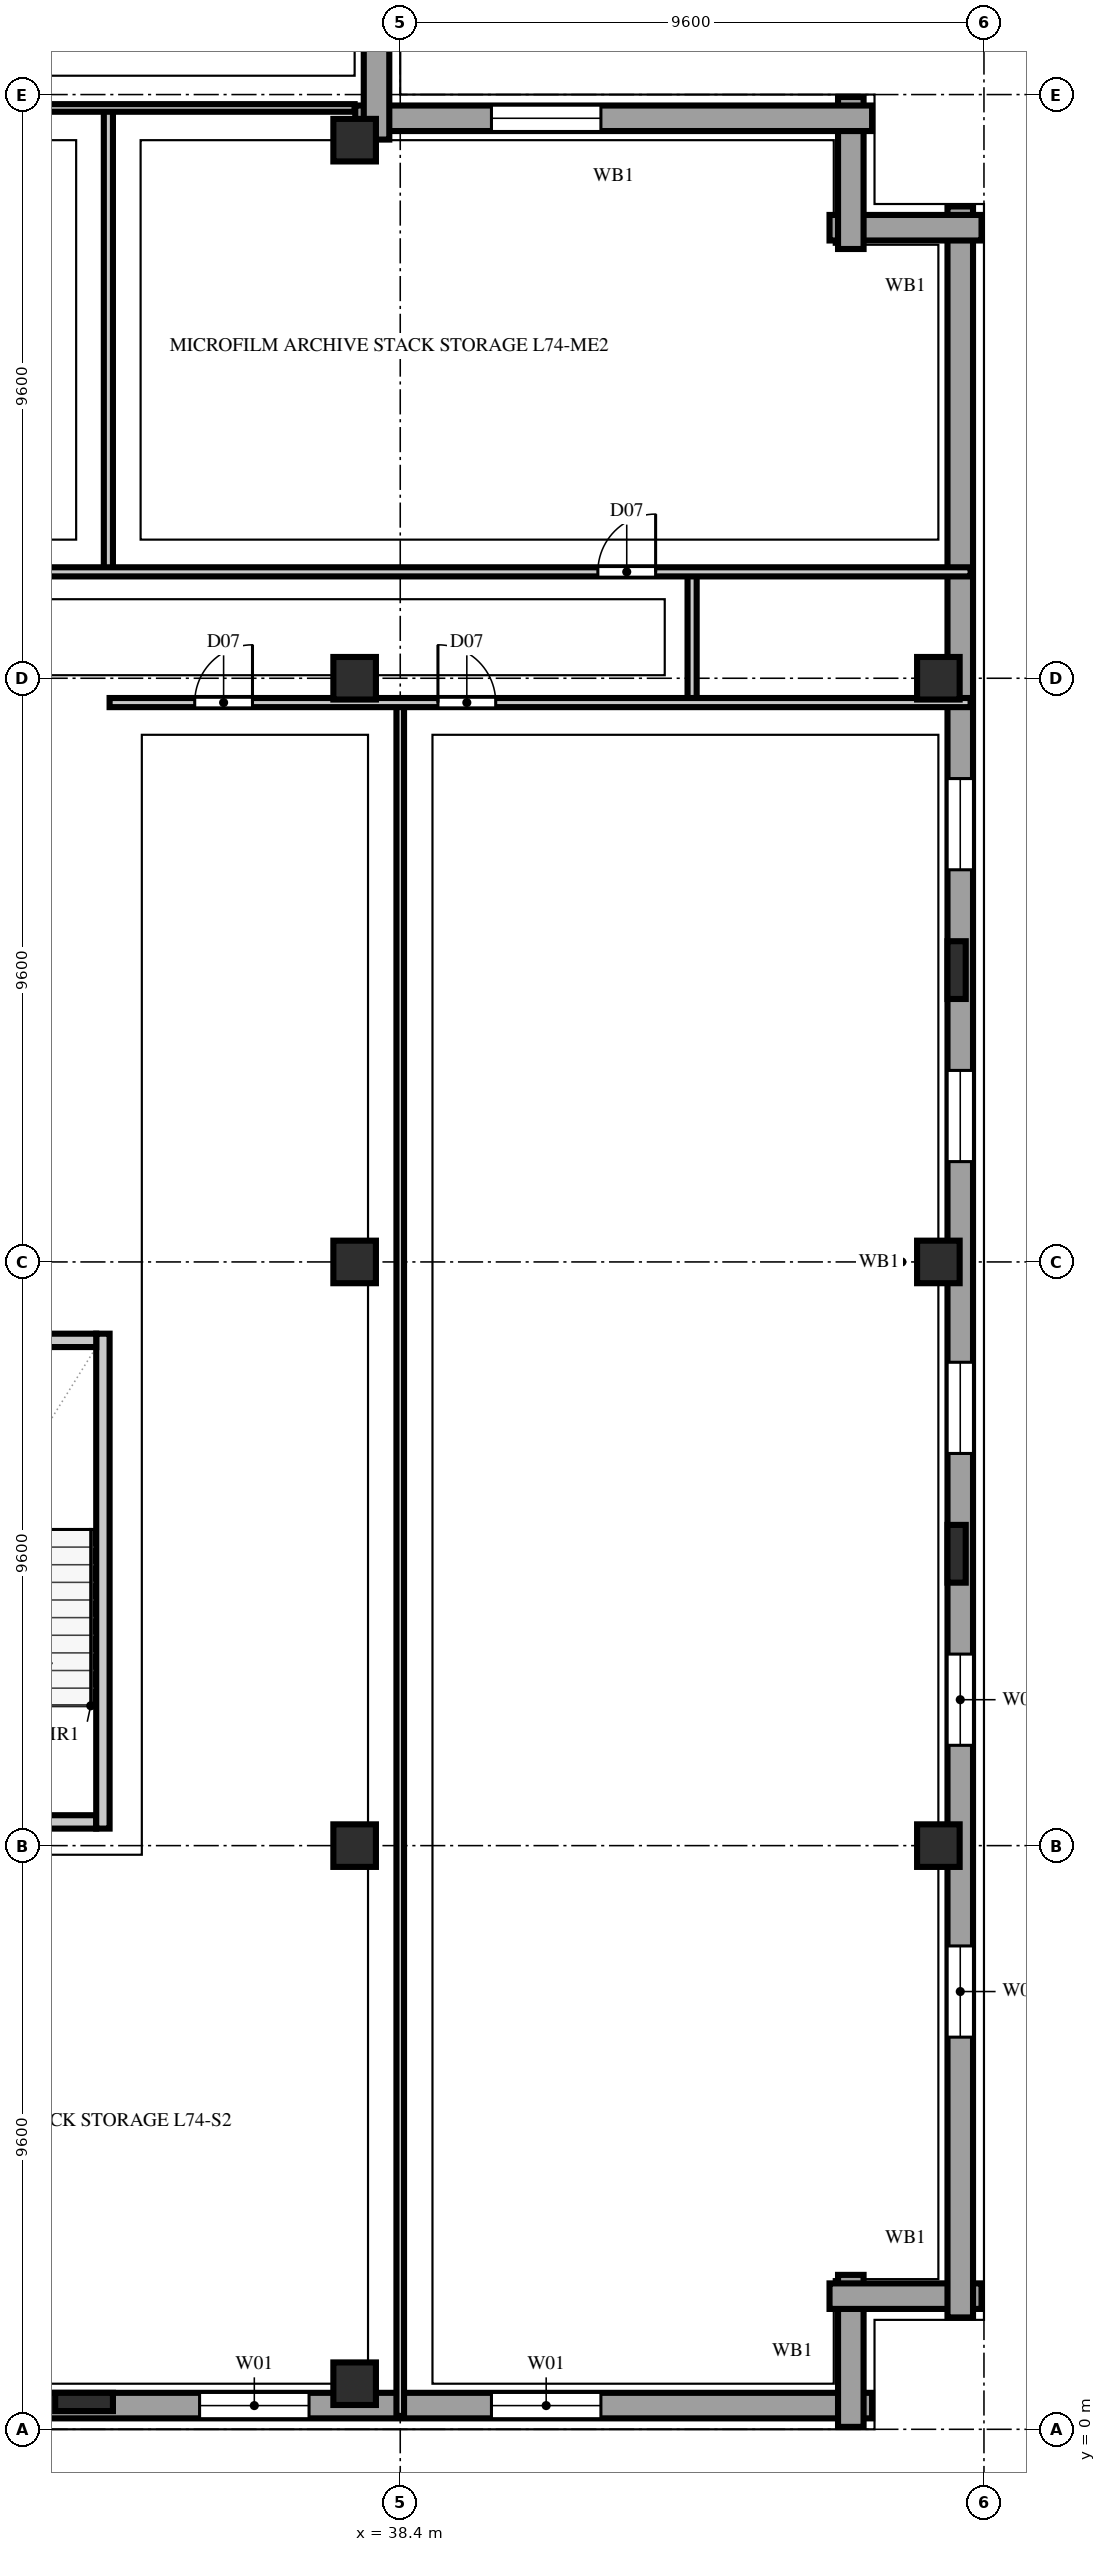
"""IFC4 building model, lengths in metres.
Left out: names, types, materials, properties, quantities, classifications, styles, units other than length and angle.
Written with IfcOpenShell. Run it as: python <this file> out.ifc"""

import sys

from ifc_helpers import new_model, si_unit, direction, frame, frame_2d, origin, origin_2d, place, context, subcontext, project, spatial, rectangle, extrude, element, fill, save


model = new_model("IFC4")
c1 = context("Model", 3, precision=1e-05, world=origin(), true_north=direction((0.0, 1.0)))
c2 = subcontext(c1, "Body", "Model", "MODEL_VIEW")
j1 = project(units=[si_unit("LENGTHUNIT", "METRE"), si_unit("PLANEANGLEUNIT", "RADIAN")], contexts=[c1])
p1 = place(None, origin())
s1 = spatial("IfcSite", under=j1, at=p1, CompositionType="ELEMENT")
p2 = place(p1, origin())
s2 = spatial("IfcBuilding", under=s1, at=p2, CompositionType="ELEMENT")
p3 = place(p2, frame((0.0, 0.0, 292.4)))
s3 = spatial("IfcBuildingStorey", under=s2, at=p3, CompositionType="ELEMENT", Elevation=292.4)
for number, where, z_axis, x_axis in (
    (1, (37.65, 0.75, 0.0), (0.0, 0.0, 1.0), (1.0, 0.0, 0.0)),
    (2, (37.65, 9.6, 0.0), (0.0, 0.0, 1.0), (1.0, 0.0, 0.0)),
    (3, (37.65, 19.2, 0.0), (0.0, 0.0, 1.0), (1.0, 0.0, 0.0)),
    (4, (37.65, 28.8, 0.0), (0.0, 0.0, 1.0), (1.0, 0.0, 0.0)),
    (5, (37.65, 37.65, 0.0), (0.0, 0.0, 1.0), (1.0, 0.0, 0.0)),
    (6, (47.25, 9.6, 0.0), (0.0, 0.0, 1.0), (1.0, 0.0, 0.0)),
    (7, (47.25, 19.2, 0.0), (0.0, 0.0, 1.0), (1.0, 0.0, 0.0)),
    (8, (47.25, 28.8, 0.0), (0.0, 0.0, 1.0), (1.0, 0.0, 0.0)),
):
    element("IfcColumn", number, at=place(p3, frame(where, z_axis=z_axis, x_axis=x_axis)), inside=s3, PredefinedType="COLUMN", context=c2, shape_type="SweptSolid", body=[
        extrude(rectangle(XDim=0.7, YDim=0.7, at=origin_2d()), origin(), (0.0, 0.0, 1.0), 3.8),
    ])
for number, where, z_axis, x_axis in (
    (9, (33.2, 0.45, 0.0), (0.0, 0.0, 1.0), (1.0, 0.0, 0.0)),
    (10, (47.55, 14.4, 0.0), (0.0, 0.0, 1.0), (0.0, 1.0, 0.0)),
    (11, (47.55, 24.0, 0.0), (0.0, 0.0, 1.0), (0.0, 1.0, 0.0)),
):
    element("IfcColumn", number, at=place(p3, frame(where, z_axis=z_axis, x_axis=x_axis)), inside=s3, PredefinedType="PILASTER", context=c2, shape_type="SweptSolid", body=[
        extrude(rectangle(XDim=0.95, YDim=0.3, at=origin_2d()), origin(), (0.0, 0.0, 1.0), 3.8),
    ])
p4 = place(p3, frame((1.84, 0.39, 0.0), z_axis=(0.0, 0.0, 1.0), x_axis=(1.0, 0.0, 0.0)))
e12 = element("IfcWall", 12, at=p4, inside=s3, PredefinedType="SOLIDWALL", context=c2, shape_type="SweptSolid", body=[
    extrude(rectangle(XDim=44.32, YDim=0.42, at=frame_2d((22.16, 0.0))), origin(), (0.0, 0.0, 1.0), 3.54),
])
p5 = place(p4, frame((4.46, 0.0, 0.85)))
e13 = element("IfcOpeningElement", 13, at=p5, cuts=e12, PredefinedType="OPENING", context=c2, shape_type="SweptSolid", body=[
    extrude(rectangle(XDim=1.8, YDim=1.85, at=frame_2d((0.9, 0.925))), frame((0.0, 0.222, 0.0), z_axis=(0.0, -1.0, 0.0), x_axis=(1.0, 0.0, 0.0)), (0.0, 0.0, 1.0), 0.444),
])
p6 = place(p4, frame((9.26, 0.0, 0.85)))
e14 = element("IfcOpeningElement", 14, at=p6, cuts=e12, PredefinedType="OPENING", context=c2, shape_type="SweptSolid", body=[
    extrude(rectangle(XDim=1.8, YDim=1.85, at=frame_2d((0.9, 0.925))), frame((0.0, 0.222, 0.0), z_axis=(0.0, -1.0, 0.0), x_axis=(1.0, 0.0, 0.0)), (0.0, 0.0, 1.0), 0.444),
])
p7 = place(p4, frame((18.86, 0.0, 0.85)))
e15 = element("IfcOpeningElement", 15, at=p7, cuts=e12, PredefinedType="OPENING", context=c2, shape_type="SweptSolid", body=[
    extrude(rectangle(XDim=1.8, YDim=1.85, at=frame_2d((0.9, 0.925))), frame((0.0, 0.222, 0.0), z_axis=(0.0, -1.0, 0.0), x_axis=(1.0, 0.0, 0.0)), (0.0, 0.0, 1.0), 0.444),
])
p8 = place(p4, frame((28.46, 0.0, 0.85)))
e16 = element("IfcOpeningElement", 16, at=p8, cuts=e12, PredefinedType="OPENING", context=c2, shape_type="SweptSolid", body=[
    extrude(rectangle(XDim=1.8, YDim=1.85, at=frame_2d((0.9, 0.925))), frame((0.0, 0.222, 0.0), z_axis=(0.0, -1.0, 0.0), x_axis=(1.0, 0.0, 0.0)), (0.0, 0.0, 1.0), 0.444),
])
p9 = place(p4, frame((33.26, 0.0, 0.85)))
e17 = element("IfcOpeningElement", 17, at=p9, cuts=e12, PredefinedType="OPENING", context=c2, shape_type="SweptSolid", body=[
    extrude(rectangle(XDim=1.8, YDim=1.85, at=frame_2d((0.9, 0.925))), frame((0.0, 0.222, 0.0), z_axis=(0.0, -1.0, 0.0), x_axis=(1.0, 0.0, 0.0)), (0.0, 0.0, 1.0), 0.444),
])
p10 = place(p4, frame((38.06, 0.0, 0.85)))
e18 = element("IfcOpeningElement", 18, at=p10, cuts=e12, PredefinedType="OPENING", context=c2, shape_type="SweptSolid", body=[
    extrude(rectangle(XDim=1.8, YDim=1.85, at=frame_2d((0.9, 0.925))), frame((0.0, 0.222, 0.0), z_axis=(0.0, -1.0, 0.0), x_axis=(1.0, 0.0, 0.0)), (0.0, 0.0, 1.0), 0.444),
])
for number, where, z_axis, x_axis in (
    (19, (45.81, 0.04, 0.0), (0.0, 0.0, 1.0), (0.0, 1.0, 0.0)),
    (20, (45.46, 2.19, 0.0), (0.0, 0.0, 1.0), (1.0, 0.0, 0.0)),
):
    element("IfcWall", number, at=place(p3, frame(where, z_axis=z_axis, x_axis=x_axis)), inside=s3, PredefinedType="SOLIDWALL", context=c2, shape_type="SweptSolid", body=[
        extrude(rectangle(XDim=2.5, YDim=0.42, at=frame_2d((1.25, 0.0))), origin(), (0.0, 0.0, 1.0), 3.54),
    ])
p11 = place(p3, frame((47.61, 1.84, 0.0), z_axis=(0.0, 0.0, 1.0), x_axis=(0.0, 1.0, 0.0)))
e21 = element("IfcWall", 21, at=p11, inside=s3, PredefinedType="SOLIDWALL", context=c2, shape_type="SweptSolid", body=[
    extrude(rectangle(XDim=34.72, YDim=0.42, at=frame_2d((17.36, 0.0))), origin(), (0.0, 0.0, 1.0), 3.54),
])
p12 = place(p11, frame((4.61, 0.0, 0.85)))
e22 = element("IfcOpeningElement", 22, at=p12, cuts=e21, PredefinedType="OPENING", context=c2, shape_type="SweptSolid", body=[
    extrude(rectangle(XDim=1.5, YDim=1.85, at=frame_2d((0.75, 0.925))), frame((0.0, 0.222, 0.0), z_axis=(0.0, -1.0, 0.0), x_axis=(1.0, 0.0, 0.0)), (0.0, 0.0, 1.0), 0.444),
])
p13 = place(p11, frame((9.41, 0.0, 0.85)))
e23 = element("IfcOpeningElement", 23, at=p13, cuts=e21, PredefinedType="OPENING", context=c2, shape_type="SweptSolid", body=[
    extrude(rectangle(XDim=1.5, YDim=1.85, at=frame_2d((0.75, 0.925))), frame((0.0, 0.222, 0.0), z_axis=(0.0, -1.0, 0.0), x_axis=(1.0, 0.0, 0.0)), (0.0, 0.0, 1.0), 0.444),
])
p14 = place(p11, frame((14.21, 0.0, 0.85)))
e24 = element("IfcOpeningElement", 24, at=p14, cuts=e21, PredefinedType="OPENING", context=c2, shape_type="SweptSolid", body=[
    extrude(rectangle(XDim=1.5, YDim=1.85, at=frame_2d((0.75, 0.925))), frame((0.0, 0.222, 0.0), z_axis=(0.0, -1.0, 0.0), x_axis=(1.0, 0.0, 0.0)), (0.0, 0.0, 1.0), 0.444),
])
p15 = place(p11, frame((19.01, 0.0, 0.85)))
e25 = element("IfcOpeningElement", 25, at=p15, cuts=e21, PredefinedType="OPENING", context=c2, shape_type="SweptSolid", body=[
    extrude(rectangle(XDim=1.5, YDim=1.85, at=frame_2d((0.75, 0.925))), frame((0.0, 0.222, 0.0), z_axis=(0.0, -1.0, 0.0), x_axis=(1.0, 0.0, 0.0)), (0.0, 0.0, 1.0), 0.444),
])
p16 = place(p11, frame((23.81, 0.0, 0.85)))
e26 = element("IfcOpeningElement", 26, at=p16, cuts=e21, PredefinedType="OPENING", context=c2, shape_type="SweptSolid", body=[
    extrude(rectangle(XDim=1.5, YDim=1.85, at=frame_2d((0.75, 0.925))), frame((0.0, 0.222, 0.0), z_axis=(0.0, -1.0, 0.0), x_axis=(1.0, 0.0, 0.0)), (0.0, 0.0, 1.0), 0.444),
])
for number, where, z_axis, x_axis in (
    (27, (47.96, 36.21, 0.0), (0.0, 0.0, 1.0), (-1.0, 0.0, 0.0)),
    (28, (45.81, 35.86, 0.0), (0.0, 0.0, 1.0), (0.0, 1.0, 0.0)),
):
    element("IfcWall", number, at=place(p3, frame(where, z_axis=z_axis, x_axis=x_axis)), inside=s3, PredefinedType="SOLIDWALL", context=c2, shape_type="SweptSolid", body=[
        extrude(rectangle(XDim=2.5, YDim=0.42, at=frame_2d((1.25, 0.0))), origin(), (0.0, 0.0, 1.0), 3.54),
    ])
p17 = place(p3, frame((46.16, 38.01, 0.0), z_axis=(0.0, 0.0, 1.0), x_axis=(-1.0, 0.0, 0.0)))
e29 = element("IfcWall", 29, at=p17, inside=s3, PredefinedType="SOLIDWALL", context=c2, shape_type="SweptSolid", body=[
    extrude(rectangle(XDim=8.5, YDim=0.42, at=frame_2d((4.25, 0.0))), origin(), (0.0, 0.0, 1.0), 3.54),
])
p18 = place(p17, frame((4.46, 0.0, 0.85)))
e30 = element("IfcOpeningElement", 30, at=p18, cuts=e29, PredefinedType="OPENING", context=c2, shape_type="SweptSolid", body=[
    extrude(rectangle(XDim=1.8, YDim=1.85, at=frame_2d((0.9, 0.925))), frame((0.0, 0.222, 0.0), z_axis=(0.0, -1.0, 0.0), x_axis=(1.0, 0.0, 0.0)), (0.0, 0.0, 1.0), 0.444),
])
p19 = place(p3, frame((38.01, 37.66, 0.0), z_axis=(0.0, 0.0, 1.0), x_axis=(0.0, 1.0, 0.0)))
e31 = element("IfcWall", 31, at=p19, inside=s3, PredefinedType="SOLIDWALL", context=c2, shape_type="SweptSolid", body=[
    extrude(rectangle(XDim=8.5, YDim=0.42, at=frame_2d((4.25, 0.0))), origin(), (0.0, 0.0, 1.0), 3.54),
])
p20 = place(p19, frame((2.24, 0.0, 0.85)))
e32 = element("IfcOpeningElement", 32, at=p20, cuts=e31, PredefinedType="OPENING", context=c2, shape_type="SweptSolid", body=[
    extrude(rectangle(XDim=1.8, YDim=1.85, at=frame_2d((0.9, 0.925))), frame((0.0, 0.222, 0.0), z_axis=(0.0, -1.0, 0.0), x_axis=(1.0, 0.0, 0.0)), (0.0, 0.0, 1.0), 0.444),
])
p21 = place(p3, frame((29.75, 9.99, 0.0), z_axis=(0.0, 0.0, 1.0), x_axis=(1.0, 0.0, 0.0)))
e33 = element("IfcWall", 33, at=p21, inside=s3, PredefinedType="SOLIDWALL", context=c2, shape_type="SweptSolid", body=[
    extrude(rectangle(XDim=3.65, YDim=0.22, at=frame_2d((1.825, 0.0))), origin(), (0.0, 0.0, 1.0), 3.54),
])
p22 = place(p3, frame((33.51, 9.88, 0.0), z_axis=(0.0, 0.0, 1.0), x_axis=(0.0, 1.0, 0.0)))
e34 = element("IfcWall", 34, at=p22, inside=s3, PredefinedType="SOLIDWALL", context=c2, shape_type="SweptSolid", body=[
    extrude(rectangle(XDim=8.14, YDim=0.22, at=frame_2d((4.07, 0.0))), origin(), (0.0, 0.0, 1.0), 3.54),
])
p23 = place(p3, frame((29.75, 17.91, 0.0), z_axis=(0.0, 0.0, 1.0), x_axis=(1.0, 0.0, 0.0)))
e35 = element("IfcWall", 35, at=p23, inside=s3, PredefinedType="SOLIDWALL", context=c2, shape_type="SweptSolid", body=[
    extrude(rectangle(XDim=3.65, YDim=0.22, at=frame_2d((1.825, 0.0))), origin(), (0.0, 0.0, 1.0), 3.54),
])
p24 = place(p3, frame((43.2, 28.4, 0.0), z_axis=(0.0, 0.0, 1.0), x_axis=(0.0, 1.0, 0.0)))
e36 = element("IfcWall", 36, at=p24, inside=s3, PredefinedType="PARTITIONING", context=c2, shape_type="SweptSolid", body=[
    extrude(rectangle(XDim=2.15, YDim=0.15, at=frame_2d((1.075, 0.0))), origin(), (0.0, 0.0, 1.0), 3.54),
])
p25 = place(p3, frame((38.4, 0.22, 0.0), z_axis=(0.0, 0.0, 1.0), x_axis=(0.0, 1.0, 0.0)))
e37 = element("IfcWall", 37, at=p25, inside=s3, PredefinedType="PARTITIONING", context=c2, shape_type="SweptSolid", body=[
    extrude(rectangle(XDim=28.18, YDim=0.125, at=frame_2d((14.09, 0.0))), origin(), (0.0, 0.0, 1.0), 3.54),
])
p26 = place(p3, frame((33.62, 28.4, 0.0), z_axis=(0.0, 0.0, 1.0), x_axis=(1.0, 0.0, 0.0)))
e38 = element("IfcWall", 38, at=p26, inside=s3, PredefinedType="PARTITIONING", context=c2, shape_type="SweptSolid", body=[
    extrude(rectangle(XDim=14.16, YDim=0.15, at=frame_2d((7.08, 0.0))), origin(), (0.0, 0.0, 1.0), 3.54),
])
p27 = place(p26, frame((1.4, 0.0, 0.0)))
e39 = element("IfcOpeningElement", 39, at=p27, cuts=e38, PredefinedType="OPENING", context=c2, shape_type="SweptSolid", body=[
    extrude(rectangle(XDim=0.95, YDim=2.15, at=frame_2d((0.475, 1.075))), frame((0.0, 0.087, 0.0), z_axis=(0.0, -1.0, 0.0), x_axis=(1.0, 0.0, 0.0)), (0.0, 0.0, 1.0), 0.174),
])
p28 = place(p26, frame((5.4, 0.0, 0.0)))
e40 = element("IfcOpeningElement", 40, at=p28, cuts=e38, PredefinedType="OPENING", context=c2, shape_type="SweptSolid", body=[
    extrude(rectangle(XDim=0.95, YDim=2.15, at=frame_2d((0.475, 1.075))), frame((0.0, 0.087, 0.0), z_axis=(0.0, -1.0, 0.0), x_axis=(1.0, 0.0, 0.0)), (0.0, 0.0, 1.0), 0.174),
])
p29 = place(p3, frame((33.6, 30.55, 0.0), z_axis=(0.0, 0.0, 1.0), x_axis=(0.0, 1.0, 0.0)))
e41 = element("IfcWall", 41, at=p29, inside=s3, PredefinedType="PARTITIONING", context=c2, shape_type="SweptSolid", body=[
    extrude(rectangle(XDim=7.63, YDim=0.15, at=frame_2d((3.815, 0.0))), origin(), (0.0, 0.0, 1.0), 3.54),
])
p30 = place(p3, frame((19.2, 30.55, 0.0), z_axis=(0.0, 0.0, 1.0), x_axis=(1.0, 0.0, 0.0)))
e42 = element("IfcWall", 42, at=p30, inside=s3, PredefinedType="PARTITIONING", context=c2, shape_type="SweptSolid", body=[
    extrude(rectangle(XDim=28.58, YDim=0.15, at=frame_2d((14.29, 0.0))), origin(), (0.0, 0.0, 1.0), 3.54),
])
p31 = place(p30, frame((4.3, 0.0, 0.0)))
e43 = element("IfcOpeningElement", 43, at=p31, cuts=e42, PredefinedType="OPENING", context=c2, shape_type="SweptSolid", body=[
    extrude(rectangle(XDim=0.95, YDim=2.15, at=frame_2d((0.475, 1.075))), frame((0.0, 0.087, 0.0), z_axis=(0.0, -1.0, 0.0), x_axis=(1.0, 0.0, 0.0)), (0.0, 0.0, 1.0), 0.174),
])
p32 = place(p30, frame((22.45, 0.0, 0.0)))
e44 = element("IfcOpeningElement", 44, at=p32, cuts=e42, PredefinedType="OPENING", context=c2, shape_type="SweptSolid", body=[
    extrude(rectangle(XDim=0.95, YDim=2.15, at=frame_2d((0.475, 1.075))), frame((0.0, 0.087, 0.0), z_axis=(0.0, -1.0, 0.0), x_axis=(1.0, 0.0, 0.0)), (0.0, 0.0, 1.0), 0.174),
])
p33 = place(p3, frame((19.28, 38.18, 0.0), z_axis=(0.0, 0.0, 1.0), x_axis=(1.0, 0.0, 0.0)))
e45 = element("IfcWall", 45, at=p33, inside=s3, PredefinedType="PARTITIONING", context=c2, shape_type="SweptSolid", body=[
    extrude(rectangle(XDim=18.37, YDim=0.125, at=frame_2d((9.185, 0.0))), origin(), (0.0, 0.0, 1.0), 3.54),
])
p34 = place(p9, origin())
e46 = element("IfcWindow", 46, at=p34, inside=s3, PartitioningType="DOUBLE_PANEL_VERTICAL", PredefinedType="WINDOW", context=c2, shape_type="SweptSolid", body=[
    extrude(rectangle(XDim=1.8, YDim=1.85, at=frame_2d((0.9, 0.925))), frame((0.0, 0.11, 0.0), z_axis=(0.0, -1.0, 0.0), x_axis=(1.0, 0.0, 0.0)), (0.0, 0.0, 1.0), 0.06),
])
fill(e17, e46)
p35 = place(p10, origin())
e47 = element("IfcWindow", 47, at=p35, inside=s3, PartitioningType="DOUBLE_PANEL_VERTICAL", PredefinedType="WINDOW", context=c2, shape_type="SweptSolid", body=[
    extrude(rectangle(XDim=1.8, YDim=1.85, at=frame_2d((0.9, 0.925))), frame((0.0, 0.11, 0.0), z_axis=(0.0, -1.0, 0.0), x_axis=(1.0, 0.0, 0.0)), (0.0, 0.0, 1.0), 0.06),
])
fill(e18, e47)
p36 = place(p12, origin())
e48 = element("IfcWindow", 48, at=p36, inside=s3, PartitioningType="DOUBLE_PANEL_VERTICAL", PredefinedType="WINDOW", context=c2, shape_type="SweptSolid", body=[
    extrude(rectangle(XDim=1.5, YDim=1.85, at=frame_2d((0.75, 0.925))), frame((0.0, 0.11, 0.0), z_axis=(0.0, -1.0, 0.0), x_axis=(1.0, 0.0, 0.0)), (0.0, 0.0, 1.0), 0.06),
])
fill(e22, e48)
p37 = place(p13, origin())
e49 = element("IfcWindow", 49, at=p37, inside=s3, PartitioningType="DOUBLE_PANEL_VERTICAL", PredefinedType="WINDOW", context=c2, shape_type="SweptSolid", body=[
    extrude(rectangle(XDim=1.5, YDim=1.85, at=frame_2d((0.75, 0.925))), frame((0.0, 0.11, 0.0), z_axis=(0.0, -1.0, 0.0), x_axis=(1.0, 0.0, 0.0)), (0.0, 0.0, 1.0), 0.06),
])
fill(e23, e49)
p38 = place(p14, origin())
e50 = element("IfcWindow", 50, at=p38, inside=s3, PartitioningType="DOUBLE_PANEL_VERTICAL", PredefinedType="WINDOW", context=c2, shape_type="SweptSolid", body=[
    extrude(rectangle(XDim=1.5, YDim=1.85, at=frame_2d((0.75, 0.925))), frame((0.0, 0.11, 0.0), z_axis=(0.0, -1.0, 0.0), x_axis=(1.0, 0.0, 0.0)), (0.0, 0.0, 1.0), 0.06),
])
fill(e24, e50)
p39 = place(p15, origin())
e51 = element("IfcWindow", 51, at=p39, inside=s3, PartitioningType="DOUBLE_PANEL_VERTICAL", PredefinedType="WINDOW", context=c2, shape_type="SweptSolid", body=[
    extrude(rectangle(XDim=1.5, YDim=1.85, at=frame_2d((0.75, 0.925))), frame((0.0, 0.11, 0.0), z_axis=(0.0, -1.0, 0.0), x_axis=(1.0, 0.0, 0.0)), (0.0, 0.0, 1.0), 0.06),
])
fill(e25, e51)
p40 = place(p16, origin())
e52 = element("IfcWindow", 52, at=p40, inside=s3, PartitioningType="DOUBLE_PANEL_VERTICAL", PredefinedType="WINDOW", context=c2, shape_type="SweptSolid", body=[
    extrude(rectangle(XDim=1.5, YDim=1.85, at=frame_2d((0.75, 0.925))), frame((0.0, 0.11, 0.0), z_axis=(0.0, -1.0, 0.0), x_axis=(1.0, 0.0, 0.0)), (0.0, 0.0, 1.0), 0.06),
])
fill(e26, e52)
p41 = place(p18, origin())
e53 = element("IfcWindow", 53, at=p41, inside=s3, PartitioningType="DOUBLE_PANEL_VERTICAL", PredefinedType="WINDOW", context=c2, shape_type="SweptSolid", body=[
    extrude(rectangle(XDim=1.8, YDim=1.85, at=frame_2d((0.9, 0.925))), frame((0.0, 0.11, 0.0), z_axis=(0.0, -1.0, 0.0), x_axis=(1.0, 0.0, 0.0)), (0.0, 0.0, 1.0), 0.06),
])
fill(e30, e53)
p42 = place(p27, origin())
e54 = element("IfcDoor", 54, at=p42, inside=s3, OperationType="SINGLE_SWING_RIGHT", PredefinedType="DOOR", context=c2, shape_type="SweptSolid", body=[
    extrude(rectangle(XDim=0.95, YDim=2.15, at=frame_2d((0.475, 1.075))), frame((0.0, 0.025, 0.0), z_axis=(0.0, -1.0, 0.0), x_axis=(1.0, 0.0, 0.0)), (0.0, 0.0, 1.0), 0.05),
])
fill(e39, e54)
p43 = place(p28, origin())
e55 = element("IfcDoor", 55, at=p43, inside=s3, OperationType="SINGLE_SWING_LEFT", PredefinedType="DOOR", context=c2, shape_type="SweptSolid", body=[
    extrude(rectangle(XDim=0.95, YDim=2.15, at=frame_2d((0.475, 1.075))), frame((0.0, 0.025, 0.0), z_axis=(0.0, -1.0, 0.0), x_axis=(1.0, 0.0, 0.0)), (0.0, 0.0, 1.0), 0.05),
])
fill(e40, e55)
p44 = place(p32, origin())
e56 = element("IfcDoor", 56, at=p44, inside=s3, OperationType="SINGLE_SWING_RIGHT", PredefinedType="DOOR", context=c2, shape_type="SweptSolid", body=[
    extrude(rectangle(XDim=0.95, YDim=2.15, at=frame_2d((0.475, 1.075))), frame((0.0, 0.025, 0.0), z_axis=(0.0, -1.0, 0.0), x_axis=(1.0, 0.0, 0.0)), (0.0, 0.0, 1.0), 0.05),
])
fill(e44, e56)
save(model, sys.argv[1])
